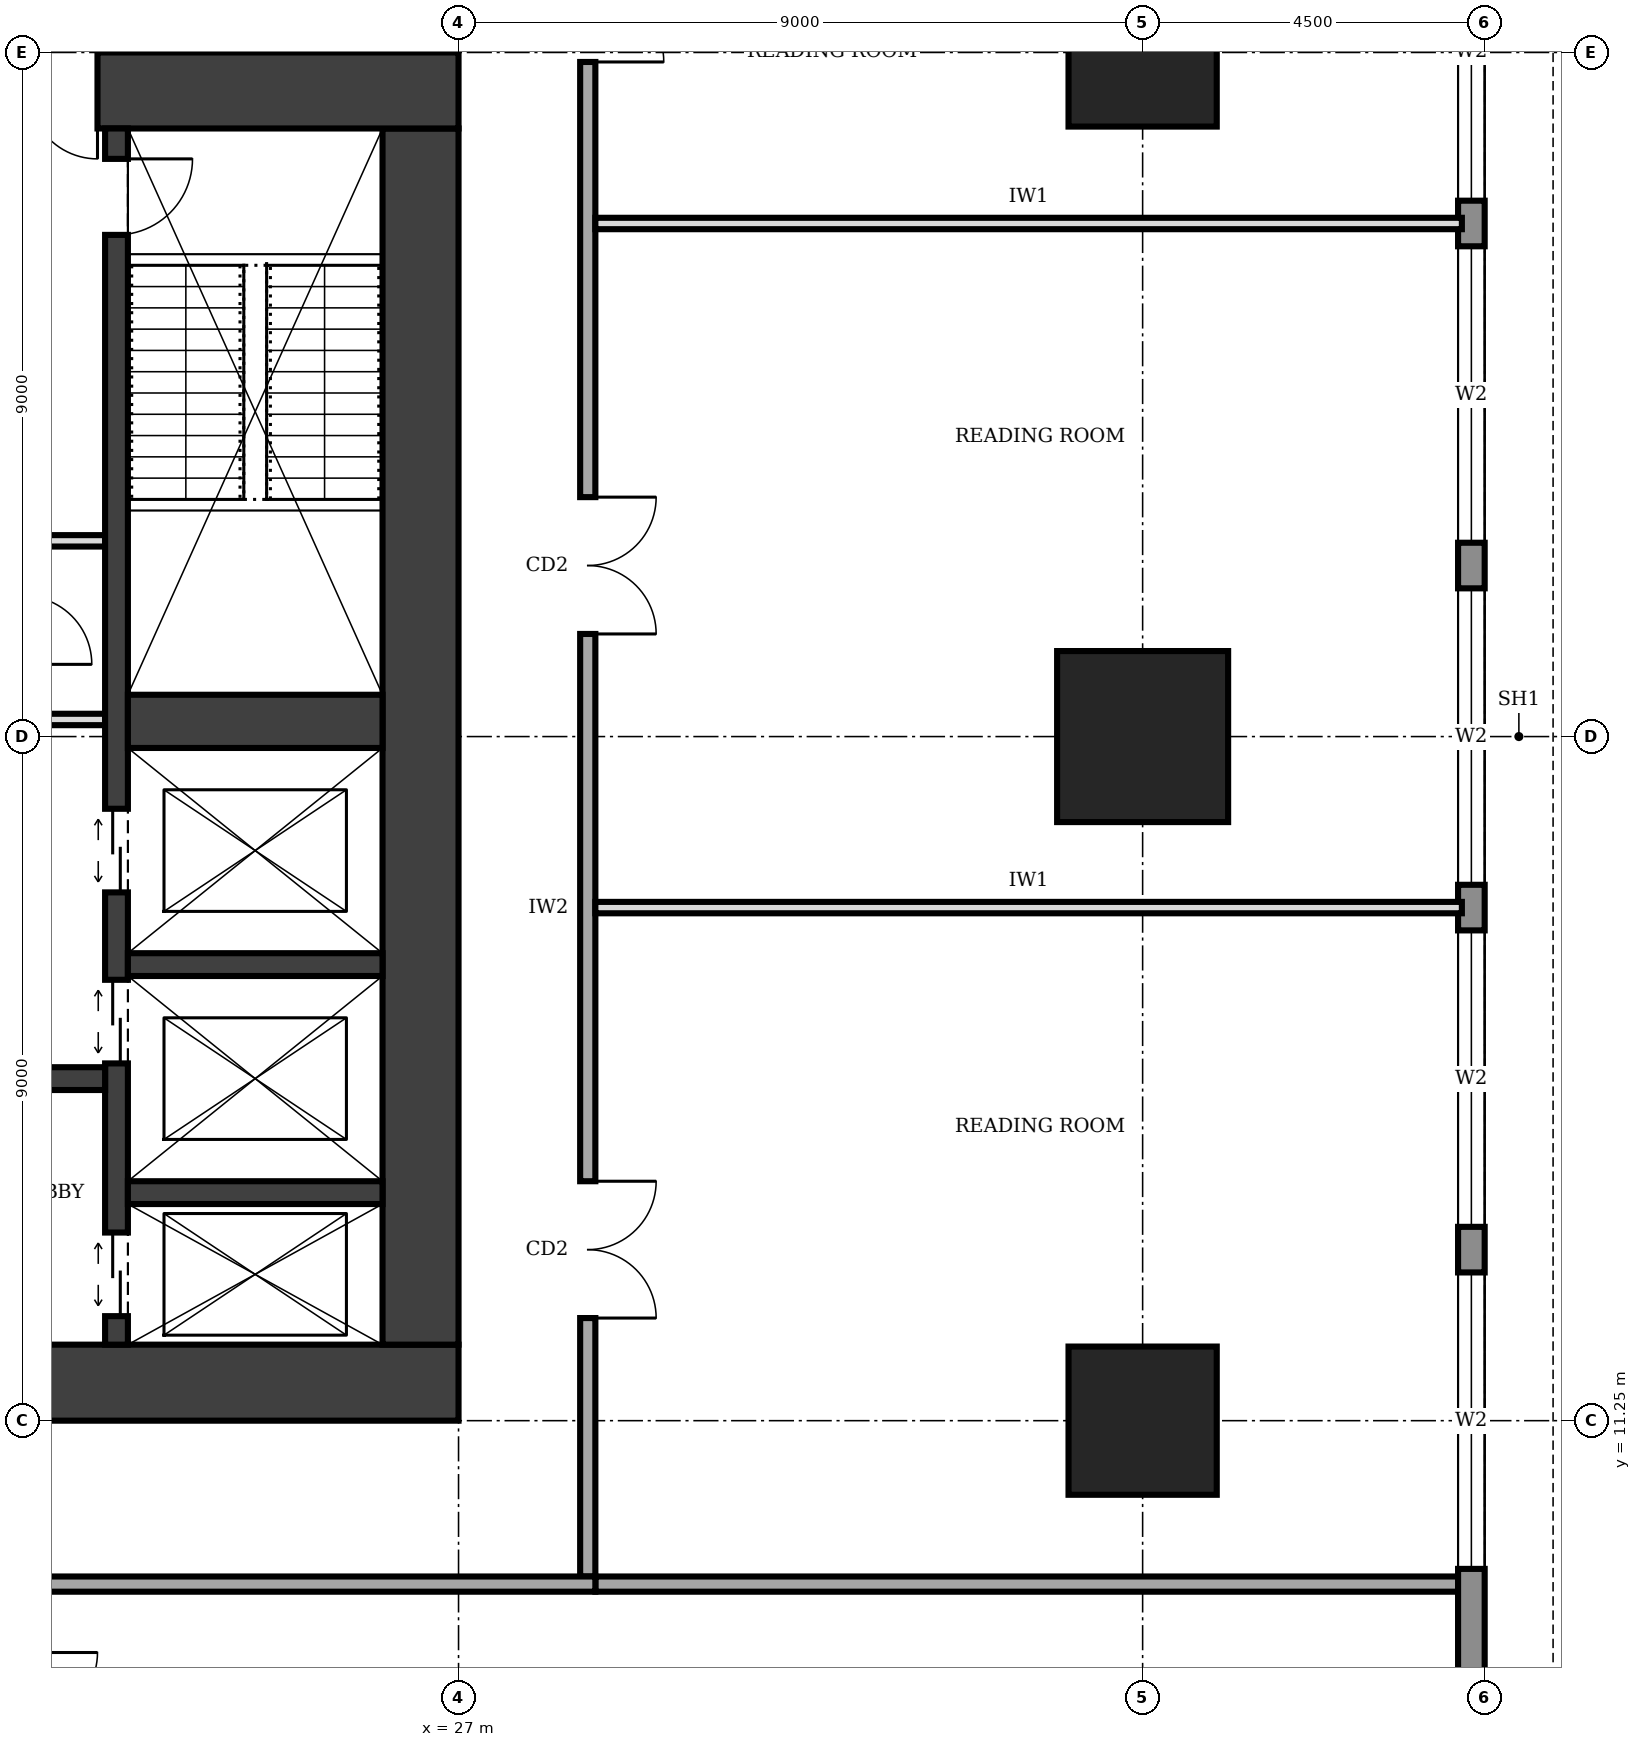
"""IFC4 building model, lengths in metres.
Left out: names, types, materials, properties, quantities, classifications, styles, units other than length and angle.
Written with IfcOpenShell. Run it as: python <this file> out.ifc"""

import sys

from ifc_helpers import new_model, si_unit, direction, frame, frame_2d, origin, origin_2d, place, context, subcontext, project, spatial, rectangle, extrude, element, fill, save


model = new_model("IFC4")
c1 = context("Model", 3, precision=1e-05, world=origin(), true_north=direction((0.0, 1.0)))
c2 = subcontext(c1, "Body", "Model", "MODEL_VIEW")
j1 = project(units=[si_unit("LENGTHUNIT", "METRE"), si_unit("PLANEANGLEUNIT", "RADIAN")], contexts=[c1])
p1 = place(None, origin())
s1 = spatial("IfcSite", under=j1, at=p1, CompositionType="ELEMENT")
p2 = place(p1, origin())
s2 = spatial("IfcBuilding", under=s1, at=p2, CompositionType="ELEMENT")
p3 = place(p2, frame((0.0, 0.0, 237.0)))
s3 = spatial("IfcBuildingStorey", under=s2, at=p3, CompositionType="ELEMENT", Elevation=237.0)
p4 = place(p3, frame((13.5, 11.75, 0.0), z_axis=(0.0, 0.0, 1.0), x_axis=(1.0, 0.0, 0.0)))
e1 = element("IfcWall", 1, at=p4, inside=s3, PredefinedType="SHEAR", context=c2, shape_type="SweptSolid", body=[
    extrude(rectangle(XDim=13.5, YDim=1.0, at=frame_2d((6.75, 0.0))), origin(), (0.0, 0.0, 1.0), 4.0),
])
p5 = place(p4, frame((4.75, 0.0, 0.0)))
e2 = element("IfcOpeningElement", 2, at=p5, cuts=e1, PredefinedType="OPENING", context=c2, shape_type="SweptSolid", body=[
    extrude(rectangle(XDim=1.0, YDim=2.1, at=frame_2d((0.5, 1.05))), frame((0.0, 0.51, 0.0), z_axis=(0.0, -1.0, 0.0), x_axis=(1.0, 0.0, 0.0)), (0.0, 0.0, 1.0), 1.02),
])
p6 = place(p3, frame((26.5, 12.25, 0.0), z_axis=(0.0, 0.0, 1.0), x_axis=(0.0, 1.0, 0.0)))
e3 = element("IfcWall", 3, at=p6, inside=s3, PredefinedType="SHEAR", context=c2, shape_type="SweptSolid", body=[
    extrude(rectangle(XDim=16.0, YDim=1.0, at=frame_2d((8.0, 0.0))), origin(), (0.0, 0.0, 1.0), 4.0),
])
p7 = place(p3, frame((27.0, 28.75, 0.0), z_axis=(0.0, 0.0, 1.0), x_axis=(-1.0, 0.0, 0.0)))
e4 = element("IfcWall", 4, at=p7, inside=s3, PredefinedType="SHEAR", context=c2, shape_type="SweptSolid", body=[
    extrude(rectangle(XDim=13.5, YDim=1.0, at=frame_2d((6.75, 0.0))), origin(), (0.0, 0.0, 1.0), 4.0),
])
p8 = place(p7, frame((4.75, 0.0, 0.0)))
e5 = element("IfcOpeningElement", 5, at=p8, cuts=e4, PredefinedType="OPENING", context=c2, shape_type="SweptSolid", body=[
    extrude(rectangle(XDim=1.8, YDim=2.1, at=frame_2d((0.9, 1.05))), frame((0.0, 0.51, 0.0), z_axis=(0.0, -1.0, 0.0), x_axis=(1.0, 0.0, 0.0)), (0.0, 0.0, 1.0), 1.02),
])
p9 = place(p3, frame((22.5, 12.25, 0.0), z_axis=(0.0, 0.0, 1.0), x_axis=(0.0, 1.0, 0.0)))
e6 = element("IfcWall", 6, at=p9, inside=s3, PredefinedType="SHEAR", context=c2, shape_type="SweptSolid", body=[
    extrude(rectangle(XDim=16.0, YDim=0.3, at=frame_2d((8.0, 0.0))), origin(), (0.0, 0.0, 1.0), 4.0),
])
p10 = place(p9, frame((14.6, 0.0, 0.0)))
e7 = element("IfcOpeningElement", 7, at=p10, cuts=e6, PredefinedType="OPENING", context=c2, shape_type="SweptSolid", body=[
    extrude(rectangle(XDim=1.0, YDim=2.1, at=frame_2d((0.5, 1.05))), frame((0.0, 0.16, 0.0), z_axis=(0.0, -1.0, 0.0), x_axis=(1.0, 0.0, 0.0)), (0.0, 0.0, 1.0), 0.32),
])
p11 = place(p9, frame((0.375, 0.0, 0.0)))
e8 = element("IfcOpeningElement", 8, at=p11, cuts=e6, PredefinedType="OPENING", context=c2, shape_type="SweptSolid", body=[
    extrude(rectangle(XDim=1.1, YDim=2.1, at=frame_2d((0.55, 1.05))), frame((0.0, 0.16, 0.0), z_axis=(0.0, -1.0, 0.0), x_axis=(1.0, 0.0, 0.0)), (0.0, 0.0, 1.0), 0.32),
])
p12 = place(p9, frame((3.7, 0.0, 0.0)))
e9 = element("IfcOpeningElement", 9, at=p12, cuts=e6, PredefinedType="OPENING", context=c2, shape_type="SweptSolid", body=[
    extrude(rectangle(XDim=1.1, YDim=2.1, at=frame_2d((0.55, 1.05))), frame((0.0, 0.16, 0.0), z_axis=(0.0, -1.0, 0.0), x_axis=(1.0, 0.0, 0.0)), (0.0, 0.0, 1.0), 0.32),
])
p13 = place(p9, frame((5.95, 0.0, 0.0)))
e10 = element("IfcOpeningElement", 10, at=p13, cuts=e6, PredefinedType="OPENING", context=c2, shape_type="SweptSolid", body=[
    extrude(rectangle(XDim=1.1, YDim=2.1, at=frame_2d((0.55, 1.05))), frame((0.0, 0.16, 0.0), z_axis=(0.0, -1.0, 0.0), x_axis=(1.0, 0.0, 0.0)), (0.0, 0.0, 1.0), 0.32),
])
p14 = place(p3, frame((18.15, 15.75, 0.0), z_axis=(0.0, 0.0, 1.0), x_axis=(1.0, 0.0, 0.0)))
e11 = element("IfcWall", 11, at=p14, inside=s3, PredefinedType="SHEAR", context=c2, shape_type="SweptSolid", body=[
    extrude(rectangle(XDim=4.2, YDim=0.3, at=frame_2d((2.1, 0.0))), origin(), (0.0, 0.0, 1.0), 4.0),
])
p15 = place(p14, frame((1.6, 0.0, 0.0)))
e12 = element("IfcOpeningElement", 12, at=p15, cuts=e11, PredefinedType="OPENING", context=c2, shape_type="SweptSolid", body=[
    extrude(rectangle(XDim=1.0, YDim=2.1, at=frame_2d((0.5, 1.05))), frame((0.0, 0.16, 0.0), z_axis=(0.0, -1.0, 0.0), x_axis=(1.0, 0.0, 0.0)), (0.0, 0.0, 1.0), 0.32),
])
for number, where, z_axis, x_axis in (
    (13, (22.65, 14.25, 0.0), (0.0, 0.0, 1.0), (1.0, 0.0, 0.0)),
    (14, (22.65, 17.25, 0.0), (0.0, 0.0, 1.0), (1.0, 0.0, 0.0)),
):
    element("IfcWall", number, at=place(p3, frame(where, z_axis=z_axis, x_axis=x_axis)), inside=s3, PredefinedType="SHEAR", context=c2, shape_type="SweptSolid", body=[
        extrude(rectangle(XDim=3.35, YDim=0.3, at=frame_2d((1.675, 0.0))), origin(), (0.0, 0.0, 1.0), 4.0),
    ])
p16 = place(p3, frame((22.65, 20.45, 0.0), z_axis=(0.0, 0.0, 1.0), x_axis=(1.0, 0.0, 0.0)))
e15 = element("IfcWall", 15, at=p16, inside=s3, PredefinedType="SHEAR", context=c2, shape_type="SweptSolid", body=[
    extrude(rectangle(XDim=3.35, YDim=0.7, at=frame_2d((1.675, 0.0))), origin(), (0.0, 0.0, 1.0), 4.0),
])
p17 = place(p3, frame((36.0, 11.25, 0.0), z_axis=(0.0, 0.0, 1.0), x_axis=(1.0, 0.0, 0.0)))
e16 = element("IfcColumn", 16, at=p17, inside=s3, PredefinedType="COLUMN", context=c2, shape_type="SweptSolid", body=[
    extrude(rectangle(XDim=1.95, YDim=1.95, at=origin_2d()), origin(), (0.0, 0.0, 1.0), 4.0),
])
p18 = place(p3, frame((36.0, 20.25, 0.0), z_axis=(0.0, 0.0, 1.0), x_axis=(1.0, 0.0, 0.0)))
e17 = element("IfcColumn", 17, at=p18, inside=s3, PredefinedType="COLUMN", context=c2, shape_type="SweptSolid", body=[
    extrude(rectangle(XDim=2.25, YDim=2.25, at=origin_2d()), origin(), (0.0, 0.0, 1.0), 4.0),
])
p19 = place(p3, frame((36.0, 29.25, 0.0), z_axis=(0.0, 0.0, 1.0), x_axis=(1.0, 0.0, 0.0)))
e18 = element("IfcColumn", 18, at=p19, inside=s3, PredefinedType="COLUMN", context=c2, shape_type="SweptSolid", body=[
    extrude(rectangle(XDim=1.95, YDim=1.95, at=origin_2d()), origin(), (0.0, 0.0, 1.0), 4.0),
])
p20 = place(p3, frame((40.325, 4.52, 0.0), z_axis=(0.0, 0.0, 1.0), x_axis=(0.0, 1.0, 0.0)))
e19 = element("IfcWall", 19, at=p20, inside=s3, PredefinedType="STANDARD", context=c2, shape_type="SweptSolid", body=[
    extrude(rectangle(XDim=31.46, YDim=0.35, at=frame_2d((15.73, 0.0))), origin(), (0.0, 0.0, 1.0), 3.75),
])
p21 = place(p20, frame((4.78, 0.0, 0.6)))
e20 = element("IfcOpeningElement", 20, at=p21, cuts=e19, PredefinedType="OPENING", context=c2, shape_type="SweptSolid", body=[
    extrude(rectangle(XDim=3.9, YDim=2.6, at=frame_2d((1.95, 1.3))), frame((0.0, 0.185, 0.0), z_axis=(0.0, -1.0, 0.0), x_axis=(1.0, 0.0, 0.0)), (0.0, 0.0, 1.0), 0.37),
])
p22 = place(p20, frame((9.28, 0.0, 0.6)))
e21 = element("IfcOpeningElement", 21, at=p22, cuts=e19, PredefinedType="OPENING", context=c2, shape_type="SweptSolid", body=[
    extrude(rectangle(XDim=3.9, YDim=2.6, at=frame_2d((1.95, 1.3))), frame((0.0, 0.185, 0.0), z_axis=(0.0, -1.0, 0.0), x_axis=(1.0, 0.0, 0.0)), (0.0, 0.0, 1.0), 0.37),
])
p23 = place(p20, frame((13.78, 0.0, 0.6)))
e22 = element("IfcOpeningElement", 22, at=p23, cuts=e19, PredefinedType="OPENING", context=c2, shape_type="SweptSolid", body=[
    extrude(rectangle(XDim=3.9, YDim=2.6, at=frame_2d((1.95, 1.3))), frame((0.0, 0.185, 0.0), z_axis=(0.0, -1.0, 0.0), x_axis=(1.0, 0.0, 0.0)), (0.0, 0.0, 1.0), 0.37),
])
p24 = place(p20, frame((18.28, 0.0, 0.6)))
e23 = element("IfcOpeningElement", 23, at=p24, cuts=e19, PredefinedType="OPENING", context=c2, shape_type="SweptSolid", body=[
    extrude(rectangle(XDim=3.9, YDim=2.6, at=frame_2d((1.95, 1.3))), frame((0.0, 0.185, 0.0), z_axis=(0.0, -1.0, 0.0), x_axis=(1.0, 0.0, 0.0)), (0.0, 0.0, 1.0), 0.37),
])
p25 = place(p20, frame((22.78, 0.0, 0.6)))
e24 = element("IfcOpeningElement", 24, at=p25, cuts=e19, PredefinedType="OPENING", context=c2, shape_type="SweptSolid", body=[
    extrude(rectangle(XDim=3.9, YDim=2.6, at=frame_2d((1.95, 1.3))), frame((0.0, 0.185, 0.0), z_axis=(0.0, -1.0, 0.0), x_axis=(1.0, 0.0, 0.0)), (0.0, 0.0, 1.0), 0.37),
])
p26 = place(p20, frame((27.21, 0.0, 0.6)))
e25 = element("IfcOpeningElement", 25, at=p26, cuts=e19, PredefinedType="OPENING", context=c2, shape_type="SweptSolid", body=[
    extrude(rectangle(XDim=3.9, YDim=2.6, at=frame_2d((1.95, 1.3))), frame((0.0, 0.185, 0.0), z_axis=(0.0, -1.0, 0.0), x_axis=(1.0, 0.0, 0.0)), (0.0, 0.0, 1.0), 0.37),
])
for number, where, z_axis, x_axis in (
    (26, (21.35, 20.475, 0.0), (0.0, 0.0, 1.0), (1.0, 0.0, 0.0)),
    (27, (21.35, 22.825, 0.0), (0.0, 0.0, 1.0), (1.0, 0.0, 0.0)),
):
    element("IfcWall", number, at=place(p3, frame(where, z_axis=z_axis, x_axis=x_axis)), inside=s3, PredefinedType="PARTITIONING", context=c2, shape_type="SweptSolid", body=[
        extrude(rectangle(XDim=1.0, YDim=0.15, at=frame_2d((0.5, 0.0))), origin(), (0.0, 0.0, 1.0), 3.75),
    ])
p27 = place(p3, frame((11.9, 9.1, 0.0), z_axis=(0.0, 0.0, 1.0), x_axis=(1.0, 0.0, 0.0)))
e28 = element("IfcWall", 28, at=p27, inside=s3, PredefinedType="SOLIDWALL", context=c2, shape_type="SweptSolid", body=[
    extrude(rectangle(XDim=16.9, YDim=0.2, at=frame_2d((8.45, 0.0))), origin(), (0.0, 0.0, 1.0), 3.75),
])
p28 = place(p3, frame((28.7, 9.2, 0.0), z_axis=(0.0, 0.0, 1.0), x_axis=(0.0, 1.0, 0.0)))
e29 = element("IfcWall", 29, at=p28, inside=s3, PredefinedType="SOLIDWALL", context=c2, shape_type="SweptSolid", body=[
    extrude(rectangle(XDim=23.05, YDim=0.2, at=frame_2d((11.525, 0.0))), origin(), (0.0, 0.0, 1.0), 3.75),
])
p29 = place(p28, frame((3.4, 0.0, 0.0)))
e30 = element("IfcOpeningElement", 30, at=p29, cuts=e29, PredefinedType="OPENING", context=c2, shape_type="SweptSolid", body=[
    extrude(rectangle(XDim=1.8, YDim=2.1, at=frame_2d((0.9, 1.05))), frame((0.0, 0.11, 0.0), z_axis=(0.0, -1.0, 0.0), x_axis=(1.0, 0.0, 0.0)), (0.0, 0.0, 1.0), 0.22),
])
p30 = place(p28, frame((12.4, 0.0, 0.0)))
e31 = element("IfcOpeningElement", 31, at=p30, cuts=e29, PredefinedType="OPENING", context=c2, shape_type="SweptSolid", body=[
    extrude(rectangle(XDim=1.8, YDim=2.1, at=frame_2d((0.9, 1.05))), frame((0.0, 0.11, 0.0), z_axis=(0.0, -1.0, 0.0), x_axis=(1.0, 0.0, 0.0)), (0.0, 0.0, 1.0), 0.22),
])
p31 = place(p28, frame((19.925, 0.0, 0.0)))
e32 = element("IfcOpeningElement", 32, at=p31, cuts=e29, PredefinedType="OPENING", context=c2, shape_type="SweptSolid", body=[
    extrude(rectangle(XDim=1.0, YDim=2.1, at=frame_2d((0.5, 1.05))), frame((0.0, 0.11, 0.0), z_axis=(0.0, -1.0, 0.0), x_axis=(1.0, 0.0, 0.0)), (0.0, 0.0, 1.0), 0.22),
])
p32 = place(p3, frame((28.8, 9.1, 0.0), z_axis=(0.0, 0.0, 1.0), x_axis=(1.0, 0.0, 0.0)))
e33 = element("IfcWall", 33, at=p32, inside=s3, PredefinedType="SOLIDWALL", context=c2, shape_type="SweptSolid", body=[
    extrude(rectangle(XDim=11.4, YDim=0.2, at=frame_2d((5.7, 0.0))), origin(), (0.0, 0.0, 1.0), 3.75),
])
for number, where, z_axis, x_axis in (
    (34, (28.8, 18.0, 0.0), (0.0, 0.0, 1.0), (1.0, 0.0, 0.0)),
    (35, (28.8, 27.0, 0.0), (0.0, 0.0, 1.0), (1.0, 0.0, 0.0)),
):
    element("IfcWall", number, at=place(p3, frame(where, z_axis=z_axis, x_axis=x_axis)), inside=s3, PredefinedType="PARTITIONING", context=c2, shape_type="SweptSolid", body=[
        extrude(rectangle(XDim=11.4, YDim=0.15, at=frame_2d((5.7, 0.0))), origin(), (0.0, 0.0, 1.0), 3.75),
    ])
p33 = place(p21, origin())
e36 = element("IfcWindow", 36, at=p33, inside=s3, PartitioningType="SINGLE_PANEL", PredefinedType="WINDOW", context=c2, shape_type="SweptSolid", body=[
    extrude(rectangle(XDim=3.9, YDim=2.6, at=frame_2d((1.95, 1.3))), frame((0.0, 0.03, 0.0), z_axis=(0.0, -1.0, 0.0), x_axis=(1.0, 0.0, 0.0)), (0.0, 0.0, 1.0), 0.06),
])
fill(e20, e36)
p34 = place(p22, origin())
e37 = element("IfcWindow", 37, at=p34, inside=s3, PartitioningType="SINGLE_PANEL", PredefinedType="WINDOW", context=c2, shape_type="SweptSolid", body=[
    extrude(rectangle(XDim=3.9, YDim=2.6, at=frame_2d((1.95, 1.3))), frame((0.0, 0.03, 0.0), z_axis=(0.0, -1.0, 0.0), x_axis=(1.0, 0.0, 0.0)), (0.0, 0.0, 1.0), 0.06),
])
fill(e21, e37)
p35 = place(p23, origin())
e38 = element("IfcWindow", 38, at=p35, inside=s3, PartitioningType="SINGLE_PANEL", PredefinedType="WINDOW", context=c2, shape_type="SweptSolid", body=[
    extrude(rectangle(XDim=3.9, YDim=2.6, at=frame_2d((1.95, 1.3))), frame((0.0, 0.03, 0.0), z_axis=(0.0, -1.0, 0.0), x_axis=(1.0, 0.0, 0.0)), (0.0, 0.0, 1.0), 0.06),
])
fill(e22, e38)
p36 = place(p24, origin())
e39 = element("IfcWindow", 39, at=p36, inside=s3, PartitioningType="SINGLE_PANEL", PredefinedType="WINDOW", context=c2, shape_type="SweptSolid", body=[
    extrude(rectangle(XDim=3.9, YDim=2.6, at=frame_2d((1.95, 1.3))), frame((0.0, 0.03, 0.0), z_axis=(0.0, -1.0, 0.0), x_axis=(1.0, 0.0, 0.0)), (0.0, 0.0, 1.0), 0.06),
])
fill(e23, e39)
p37 = place(p25, origin())
e40 = element("IfcWindow", 40, at=p37, inside=s3, PartitioningType="SINGLE_PANEL", PredefinedType="WINDOW", context=c2, shape_type="SweptSolid", body=[
    extrude(rectangle(XDim=3.9, YDim=2.6, at=frame_2d((1.95, 1.3))), frame((0.0, 0.03, 0.0), z_axis=(0.0, -1.0, 0.0), x_axis=(1.0, 0.0, 0.0)), (0.0, 0.0, 1.0), 0.06),
])
fill(e24, e40)
p38 = place(p8, origin())
e41 = element("IfcDoor", 41, at=p38, inside=s3, OperationType="DOUBLE_DOOR_SINGLE_SWING", PredefinedType="DOOR", context=c2, shape_type="SweptSolid", body=[
    extrude(rectangle(XDim=1.8, YDim=2.1, at=frame_2d((0.9, 1.05))), frame((0.0, 0.025, 0.0), z_axis=(0.0, -1.0, 0.0), x_axis=(1.0, 0.0, 0.0)), (0.0, 0.0, 1.0), 0.05),
])
fill(e5, e41)
p39 = place(p10, frame((1.0, 0.0, 0.0), z_axis=(0.0, 0.0, 1.0), x_axis=(-1.0, 0.0, 0.0)))
e42 = element("IfcDoor", 42, at=p39, inside=s3, OperationType="SINGLE_SWING_LEFT", PredefinedType="DOOR", context=c2, shape_type="SweptSolid", body=[
    extrude(rectangle(XDim=1.0, YDim=2.1, at=frame_2d((0.5, 1.05))), frame((0.0, 0.025, 0.0), z_axis=(0.0, -1.0, 0.0), x_axis=(1.0, 0.0, 0.0)), (0.0, 0.0, 1.0), 0.05),
])
fill(e7, e42)
p40 = place(p11, origin())
e43 = element("IfcDoor", 43, at=p40, inside=s3, OperationType="DOUBLE_DOOR_SLIDING", PredefinedType="DOOR", context=c2, shape_type="SweptSolid", body=[
    extrude(rectangle(XDim=1.1, YDim=2.1, at=frame_2d((0.55, 1.05))), frame((0.0, 0.025, 0.0), z_axis=(0.0, -1.0, 0.0), x_axis=(1.0, 0.0, 0.0)), (0.0, 0.0, 1.0), 0.05),
])
fill(e8, e43)
p41 = place(p12, origin())
e44 = element("IfcDoor", 44, at=p41, inside=s3, OperationType="DOUBLE_DOOR_SLIDING", PredefinedType="DOOR", context=c2, shape_type="SweptSolid", body=[
    extrude(rectangle(XDim=1.1, YDim=2.1, at=frame_2d((0.55, 1.05))), frame((0.0, 0.025, 0.0), z_axis=(0.0, -1.0, 0.0), x_axis=(1.0, 0.0, 0.0)), (0.0, 0.0, 1.0), 0.05),
])
fill(e9, e44)
p42 = place(p13, origin())
e45 = element("IfcDoor", 45, at=p42, inside=s3, OperationType="DOUBLE_DOOR_SLIDING", PredefinedType="DOOR", context=c2, shape_type="SweptSolid", body=[
    extrude(rectangle(XDim=1.1, YDim=2.1, at=frame_2d((0.55, 1.05))), frame((0.0, 0.025, 0.0), z_axis=(0.0, -1.0, 0.0), x_axis=(1.0, 0.0, 0.0)), (0.0, 0.0, 1.0), 0.05),
])
fill(e10, e45)
p43 = place(p29, frame((1.8, 0.0, 0.0), z_axis=(0.0, 0.0, 1.0), x_axis=(-1.0, 0.0, 0.0)))
e46 = element("IfcDoor", 46, at=p43, inside=s3, OperationType="DOUBLE_DOOR_SINGLE_SWING", PredefinedType="DOOR", context=c2, shape_type="SweptSolid", body=[
    extrude(rectangle(XDim=1.8, YDim=2.1, at=frame_2d((0.9, 1.05))), frame((0.0, 0.025, 0.0), z_axis=(0.0, -1.0, 0.0), x_axis=(1.0, 0.0, 0.0)), (0.0, 0.0, 1.0), 0.05),
])
fill(e30, e46)
p44 = place(p30, frame((1.8, 0.0, 0.0), z_axis=(0.0, 0.0, 1.0), x_axis=(-1.0, 0.0, 0.0)))
e47 = element("IfcDoor", 47, at=p44, inside=s3, OperationType="DOUBLE_DOOR_SINGLE_SWING", PredefinedType="DOOR", context=c2, shape_type="SweptSolid", body=[
    extrude(rectangle(XDim=1.8, YDim=2.1, at=frame_2d((0.9, 1.05))), frame((0.0, 0.025, 0.0), z_axis=(0.0, -1.0, 0.0), x_axis=(1.0, 0.0, 0.0)), (0.0, 0.0, 1.0), 0.05),
])
fill(e31, e47)
p45 = place(p31, frame((1.0, 0.0, 0.0), z_axis=(0.0, 0.0, 1.0), x_axis=(-1.0, 0.0, 0.0)))
e48 = element("IfcDoor", 48, at=p45, inside=s3, OperationType="SINGLE_SWING_RIGHT", PredefinedType="DOOR", context=c2, shape_type="SweptSolid", body=[
    extrude(rectangle(XDim=1.0, YDim=2.1, at=frame_2d((0.5, 1.05))), frame((0.0, 0.025, 0.0), z_axis=(0.0, -1.0, 0.0), x_axis=(1.0, 0.0, 0.0)), (0.0, 0.0, 1.0), 0.05),
])
fill(e32, e48)
save(model, sys.argv[1])
